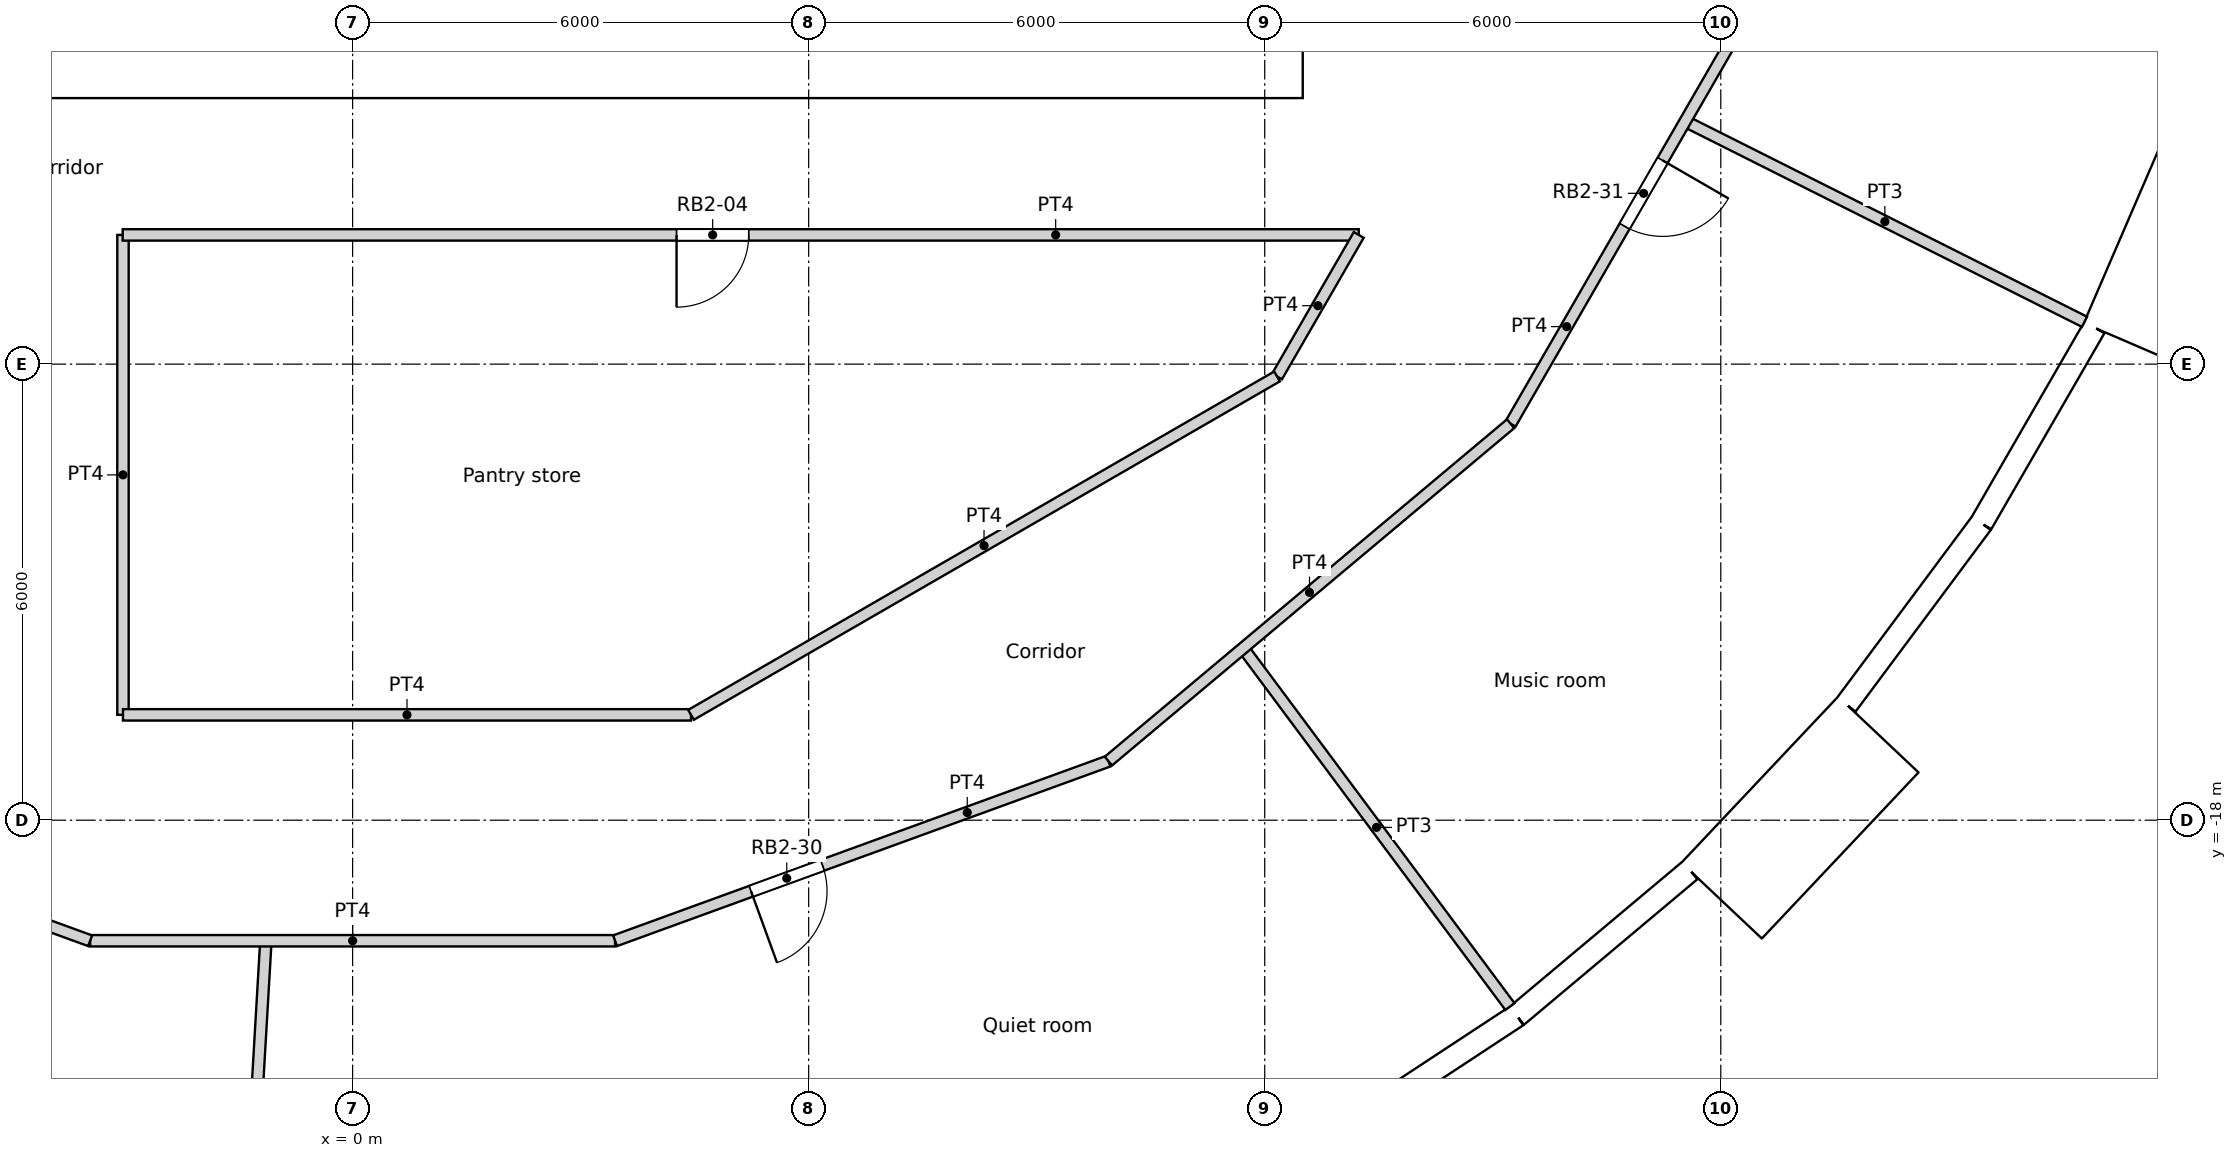
"""IFC4 building model, lengths in metres.
Left out: names, types, materials, properties, quantities, classifications, styles, units other than length and angle.
Written with IfcOpenShell. Run it as: python <this file> out.ifc"""

import sys

from ifc_helpers import new_model, si_unit, direction, frame, frame_2d, origin, origin_2d, place, context, subcontext, project, spatial, rectangle, circle, extrude, element, fill, save


model = new_model("IFC4")
c1 = context("Model", 3, precision=1e-05, world=origin(), true_north=direction((0.0, 1.0)))
c2 = subcontext(c1, "Body", "Model", "MODEL_VIEW")
j1 = project(units=[si_unit("LENGTHUNIT", "METRE"), si_unit("PLANEANGLEUNIT", "RADIAN")], contexts=[c1])
p1 = place(None, origin())
s1 = spatial("IfcSite", under=j1, at=p1, CompositionType="ELEMENT")
p2 = place(p1, origin())
s2 = spatial("IfcBuilding", under=s1, at=p2, CompositionType="ELEMENT")
p3 = place(p2, frame((0.0, 0.0, 136.8)))
s3 = spatial("IfcBuildingStorey", under=s2, at=p3, CompositionType="ELEMENT", Elevation=136.8)
for number, where, z_axis, x_axis in (
    (1, (14.659, -19.69, 0.0), (0.0, 0.0, 1.0), (1.0, 0.0, 0.0)),
    (2, (18.805, -15.779, 0.0), (0.0, 0.0, 1.0), (1.0, 0.0, 0.0)),
    (3, (21.937, -11.017, 0.0), (0.0, 0.0, 1.0), (1.0, 0.0, 0.0)),
):
    element("IfcColumn", number, at=place(p3, frame(where, z_axis=z_axis, x_axis=x_axis)), inside=s3, PredefinedType="COLUMN", context=c2, shape_type="SweptSolid", body=[
        extrude(circle(Radius=0.6, at=origin_2d()), origin(), (0.0, 0.0, 1.0), 3.6),
    ])
for number, where, z_axis, x_axis in (
    (4, (-4.188, -18.35, 0.0), (0.0, 0.0, 1.0), (1.0, 0.0, 0.0)),
    (5, (1.406, -18.77, 0.0), (0.0, 0.0, 1.0), (1.0, 0.0, 0.0)),
    (6, (6.876, -17.521, 0.0), (0.0, 0.0, 1.0), (1.0, 0.0, 0.0)),
    (7, (11.735, -14.716, 0.0), (0.0, 0.0, 1.0), (1.0, 0.0, 0.0)),
    (8, (15.552, -10.603, 0.0), (0.0, 0.0, 1.0), (1.0, 0.0, 0.0)),
):
    element("IfcColumn", number, at=place(p3, frame(where, z_axis=z_axis, x_axis=x_axis)), inside=s3, PredefinedType="COLUMN", context=c2, shape_type="SweptSolid", body=[
        extrude(circle(Radius=0.65, at=origin_2d()), origin(), (0.0, 0.0, 1.0), 3.6),
    ])
p4 = place(p3, frame((12.832, -22.206, 0.0), z_axis=(0.0, 0.0, 1.0), x_axis=(0.835508361394, 0.54947773207, 0.0)))
e9 = element("IfcWall", 9, at=p4, inside=s3, PredefinedType="SOLIDWALL", context=c2, shape_type="SweptSolid", body=[
    extrude(rectangle(XDim=2.973, YDim=0.3, at=frame_2d((1.486, 0.0))), origin(), (0.0, 0.0, 1.0), 2.8),
])
p5 = place(p4, frame((1.486, 0.0, 1.55)))
e10 = element("IfcOpeningElement", 10, at=p5, cuts=e9, PredefinedType="OPENING", context=c2, shape_type="SweptSolid", body=[
    extrude(circle(Radius=0.9, at=origin_2d()), frame((0.0, 0.16, 0.0), z_axis=(0.0, -1.0, 0.0), x_axis=(1.0, 0.0, 0.0)), (0.0, 0.0, 1.0), 0.32),
])
p6 = place(p3, frame((15.316, -20.573, 0.0), z_axis=(0.0, 0.0, 1.0), x_axis=(0.766008913364, 0.642829950023, 0.0)))
e11 = element("IfcWall", 11, at=p6, inside=s3, PredefinedType="SOLIDWALL", context=c2, shape_type="SweptSolid", body=[
    extrude(rectangle(XDim=2.973, YDim=0.3, at=frame_2d((1.486, 0.0))), origin(), (0.0, 0.0, 1.0), 3.3),
])
p7 = place(p6, frame((1.486, 0.0, 1.55)))
e12 = element("IfcOpeningElement", 12, at=p7, cuts=e11, PredefinedType="OPENING", context=c2, shape_type="SweptSolid", body=[
    extrude(circle(Radius=0.9, at=origin_2d()), frame((0.0, 0.16, 0.0), z_axis=(0.0, -1.0, 0.0), x_axis=(1.0, 0.0, 0.0)), (0.0, 0.0, 1.0), 0.32),
])
p8 = place(p3, frame((18.013, -19.056, -0.3), z_axis=(0.0, 0.0, 1.0), x_axis=(0.686217177108, 0.727396718334, 0.0)))
e13 = element("IfcWall", 13, at=p8, inside=s3, PredefinedType="ELEMENTEDWALL", context=c2, shape_type="SweptSolid", body=[
    extrude(rectangle(XDim=3.0, YDim=1.45, at=frame_2d((1.5, 0.0))), origin(), (0.0, 0.0, 1.0), 3.6),
])
p9 = place(p8, frame((1.5, 0.0, 1.85)))
e14 = element("IfcOpeningElement", 14, at=p9, cuts=e13, PredefinedType="OPENING", context=c2, shape_type="SweptSolid", body=[
    extrude(circle(Radius=0.9, at=origin_2d()), frame((0.0, 0.735, 0.0), z_axis=(0.0, -1.0, 0.0), x_axis=(1.0, 0.0, 0.0)), (0.0, 0.0, 1.0), 1.47),
])
p10 = place(p3, frame((19.653, -16.478, 0.0), z_axis=(0.0, 0.0, 1.0), x_axis=(0.597197580538, 0.80209416517, 0.0)))
e15 = element("IfcWall", 15, at=p10, inside=s3, PredefinedType="SOLIDWALL", context=c2, shape_type="SweptSolid", body=[
    extrude(rectangle(XDim=2.973, YDim=0.3, at=frame_2d((1.486, 0.0))), origin(), (0.0, 0.0, 1.0), 2.8),
])
p11 = place(p10, frame((1.486, 0.0, 1.55)))
e16 = element("IfcOpeningElement", 16, at=p11, cuts=e15, PredefinedType="OPENING", context=c2, shape_type="SweptSolid", body=[
    extrude(circle(Radius=0.9, at=origin_2d()), frame((0.0, 0.16, 0.0), z_axis=(0.0, -1.0, 0.0), x_axis=(1.0, 0.0, 0.0)), (0.0, 0.0, 1.0), 0.32),
])
p12 = place(p3, frame((21.428, -14.094, 0.0), z_axis=(0.0, 0.0, 1.0), x_axis=(0.499954672104, 0.866051572276, 0.0)))
e17 = element("IfcWall", 17, at=p12, inside=s3, PredefinedType="SOLIDWALL", context=c2, shape_type="SweptSolid", body=[
    extrude(rectangle(XDim=2.973, YDim=0.3, at=frame_2d((1.486, 0.0))), origin(), (0.0, 0.0, 1.0), 3.3),
])
p13 = place(p12, frame((1.486, 0.0, 1.55)))
e18 = element("IfcOpeningElement", 18, at=p13, cuts=e17, PredefinedType="OPENING", context=c2, shape_type="SweptSolid", body=[
    extrude(circle(Radius=0.9, at=origin_2d()), frame((0.0, 0.16, 0.0), z_axis=(0.0, -1.0, 0.0), x_axis=(1.0, 0.0, 0.0)), (0.0, 0.0, 1.0), 0.32),
])
p14 = place(p3, frame((23.444, -11.746, -0.3), z_axis=(0.0, 0.0, 1.0), x_axis=(0.396079003245, 0.918216435917, 0.0)))
e19 = element("IfcWall", 19, at=p14, inside=s3, PredefinedType="ELEMENTEDWALL", context=c2, shape_type="SweptSolid", body=[
    extrude(rectangle(XDim=3.0, YDim=1.45, at=frame_2d((1.5, 0.0))), origin(), (0.0, 0.0, 1.0), 3.6),
])
p15 = place(p14, frame((1.5, 0.0, 1.85)))
e20 = element("IfcOpeningElement", 20, at=p15, cuts=e19, PredefinedType="OPENING", context=c2, shape_type="SweptSolid", body=[
    extrude(circle(Radius=0.9, at=origin_2d()), frame((0.0, 0.735, 0.0), z_axis=(0.0, -1.0, 0.0), x_axis=(1.0, 0.0, 0.0)), (0.0, 0.0, 1.0), 1.47),
])
p16 = place(p3, frame((-12.5, -8.05, 0.0), z_axis=(0.0, 0.0, 1.0), x_axis=(1.0, 0.0, 0.0)))
e21 = element("IfcWall", 21, at=p16, inside=s3, PredefinedType="SOLIDWALL", context=c2, shape_type="SweptSolid", body=[
    extrude(rectangle(XDim=25.0, YDim=0.9, at=frame_2d((12.5, 0.0))), origin(), (0.0, 0.0, 1.0), 3.6),
])
p17 = place(p16, frame((13.4, 0.0, 0.0)))
e22 = element("IfcOpeningElement", 22, at=p17, cuts=e21, PredefinedType="OPENING", context=c2, shape_type="SweptSolid", body=[
    extrude(rectangle(XDim=1.0, YDim=2.1, at=frame_2d((0.5, 1.05))), frame((0.0, 0.45, 0.0), z_axis=(0.0, -1.0, 0.0), x_axis=(1.0, 0.0, 0.0)), (0.0, 0.0, 1.0), 0.9),
])
p18 = place(p16, frame((8.3, 0.0, 0.0)))
e23 = element("IfcOpeningElement", 23, at=p18, cuts=e21, PredefinedType="OPENING", context=c2, shape_type="SweptSolid", body=[
    extrude(rectangle(XDim=1.8, YDim=2.1, at=frame_2d((0.9, 1.05))), frame((0.0, 0.45, 0.0), z_axis=(0.0, -1.0, 0.0), x_axis=(1.0, 0.0, 0.0)), (0.0, 0.0, 1.0), 0.9),
])
p19 = place(p16, frame((14.9, 0.0, 0.0)))
e24 = element("IfcOpeningElement", 24, at=p19, cuts=e21, PredefinedType="OPENING", context=c2, shape_type="SweptSolid", body=[
    extrude(rectangle(XDim=1.8, YDim=2.1, at=frame_2d((0.9, 1.05))), frame((0.0, 0.45, 0.0), z_axis=(0.0, -1.0, 0.0), x_axis=(1.0, 0.0, 0.0)), (0.0, 0.0, 1.0), 0.9),
])
p20 = place(p3, frame((-3.025, -10.3, 0.0), z_axis=(0.0, 0.0, 1.0), x_axis=(1.0, 0.0, 0.0)))
e25 = element("IfcWall", 25, at=p20, inside=s3, PredefinedType="PARTITIONING", context=c2, shape_type="SweptSolid", body=[
    extrude(rectangle(XDim=16.262, YDim=0.15, at=frame_2d((8.131, 0.0))), origin(), (0.0, 0.0, 1.0), 3.3),
])
p21 = place(p20, frame((7.287, 0.0, 0.0)))
e26 = element("IfcOpeningElement", 26, at=p21, cuts=e25, PredefinedType="OPENING", context=c2, shape_type="SweptSolid", body=[
    extrude(rectangle(XDim=0.95, YDim=2.1, at=frame_2d((0.475, 1.05))), frame((0.0, 0.075, 0.0), z_axis=(0.0, -1.0, 0.0), x_axis=(1.0, 0.0, 0.0)), (0.0, 0.0, 1.0), 0.15),
])
p22 = place(p3, frame((12.162, -12.162, 0.0), z_axis=(0.0, 0.0, 1.0), x_axis=(0.499961633463, 0.866047553582, 0.0)))
e27 = element("IfcWall", 27, at=p22, inside=s3, PredefinedType="PARTITIONING", context=c2, shape_type="SweptSolid", body=[
    extrude(rectangle(XDim=2.15, YDim=0.15, at=frame_2d((1.075, 0.0))), origin(), (0.0, 0.0, 1.0), 3.3),
])
p23 = place(p3, frame((15.235, -12.784, 0.0), z_axis=(0.0, 0.0, 1.0), x_axis=(0.499914202267, 0.866074933462, 0.0)))
e28 = element("IfcWall", 28, at=p23, inside=s3, PredefinedType="PARTITIONING", context=c2, shape_type="SweptSolid", body=[
    extrude(rectangle(XDim=6.907, YDim=0.15, at=frame_2d((3.454, 0.0))), origin(), (0.0, 0.0, 1.0), 3.3),
])
p24 = place(p23, frame((3.0, 0.0, 0.0)))
e29 = element("IfcOpeningElement", 29, at=p24, cuts=e28, PredefinedType="OPENING", context=c2, shape_type="SweptSolid", body=[
    extrude(rectangle(XDim=1.0, YDim=2.04, at=frame_2d((0.5, 1.02))), frame((0.0, 0.075, 0.0), z_axis=(0.0, -1.0, 0.0), x_axis=(1.0, 0.0, 0.0)), (0.0, 0.0, 1.0), 0.15),
])
p25 = place(p3, frame((9.943, -17.222, 0.0), z_axis=(0.0, 0.0, 1.0), x_axis=(0.766192104565, 0.642611592567, 0.0)))
e30 = element("IfcWall", 30, at=p25, inside=s3, PredefinedType="PARTITIONING", context=c2, shape_type="SweptSolid", body=[
    extrude(rectangle(XDim=6.906, YDim=0.15, at=frame_2d((3.453, 0.0))), origin(), (0.0, 0.0, 1.0), 3.3),
])
p26 = place(p3, frame((-3.021, -16.614, 0.0), z_axis=(0.0, 0.0, 1.0), x_axis=(0.0, 1.0, 0.0)))
e31 = element("IfcWall", 31, at=p26, inside=s3, PredefinedType="PARTITIONING", context=c2, shape_type="SweptSolid", body=[
    extrude(rectangle(XDim=6.314, YDim=0.15, at=frame_2d((3.157, 0.0))), origin(), (0.0, 0.0, 1.0), 3.3),
])
p27 = place(p3, frame((-3.021, -16.614, 0.0), z_axis=(0.0, 0.0, 1.0), x_axis=(1.0, 0.0, 0.0)))
e32 = element("IfcWall", 32, at=p27, inside=s3, PredefinedType="PARTITIONING", context=c2, shape_type="SweptSolid", body=[
    extrude(rectangle(XDim=7.473, YDim=0.15, at=frame_2d((3.736, 0.0))), origin(), (0.0, 0.0, 1.0), 3.3),
])
p28 = place(p3, frame((4.452, -16.614, 0.0), z_axis=(0.0, 0.0, 1.0), x_axis=(0.866005203721, 0.500034985904, 0.0)))
e33 = element("IfcWall", 33, at=p28, inside=s3, PredefinedType="PARTITIONING", context=c2, shape_type="SweptSolid", body=[
    extrude(rectangle(XDim=8.903, YDim=0.15, at=frame_2d((4.452, 0.0))), origin(), (0.0, 0.0, 1.0), 3.3),
])
p29 = place(p3, frame((-3.453, -19.586, 0.0), z_axis=(0.0, 0.0, 1.0), x_axis=(1.0, 0.0, 0.0)))
e34 = element("IfcWall", 34, at=p29, inside=s3, PredefinedType="PARTITIONING", context=c2, shape_type="SweptSolid", body=[
    extrude(rectangle(XDim=6.906, YDim=0.15, at=frame_2d((3.453, 0.0))), origin(), (0.0, 0.0, 1.0), 3.3),
])
p30 = place(p3, frame((-9.944, -17.223, 0.0), z_axis=(0.0, 0.0, 1.0), x_axis=(0.939672634566, -0.342075050021, 0.0)))
e35 = element("IfcWall", 35, at=p30, inside=s3, PredefinedType="PARTITIONING", context=c2, shape_type="SweptSolid", body=[
    extrude(rectangle(XDim=6.908, YDim=0.15, at=frame_2d((3.454, 0.0))), origin(), (0.0, 0.0, 1.0), 3.3),
])
p31 = place(p30, frame((2.954, 0.0, 0.0)))
e36 = element("IfcOpeningElement", 36, at=p31, cuts=e35, PredefinedType="OPENING", context=c2, shape_type="SweptSolid", body=[
    extrude(rectangle(XDim=1.0, YDim=2.04, at=frame_2d((0.5, 1.02))), frame((0.0, 0.075, 0.0), z_axis=(0.0, -1.0, 0.0), x_axis=(1.0, 0.0, 0.0)), (0.0, 0.0, 1.0), 0.15),
])
p32 = place(p3, frame((3.453, -19.586, 0.0), z_axis=(0.0, 0.0, 1.0), x_axis=(0.939672634566, 0.342075050021, 0.0)))
e37 = element("IfcWall", 37, at=p32, inside=s3, PredefinedType="PARTITIONING", context=c2, shape_type="SweptSolid", body=[
    extrude(rectangle(XDim=6.908, YDim=0.15, at=frame_2d((3.454, 0.0))), origin(), (0.0, 0.0, 1.0), 3.3),
])
p33 = place(p32, frame((1.904, 0.0, 0.0)))
e38 = element("IfcOpeningElement", 38, at=p33, cuts=e37, PredefinedType="OPENING", context=c2, shape_type="SweptSolid", body=[
    extrude(rectangle(XDim=1.0, YDim=2.04, at=frame_2d((0.5, 1.02))), frame((0.0, 0.075, 0.0), z_axis=(0.0, -1.0, 0.0), x_axis=(1.0, 0.0, 0.0)), (0.0, 0.0, 1.0), 0.15),
])
p34 = place(p3, frame((-1.483, -25.454, 0.0), z_axis=(0.0, 0.0, 1.0), x_axis=(0.058147412668, 0.998308007781, 0.0)))
e39 = element("IfcWall", 39, at=p34, inside=s3, PredefinedType="PARTITIONING", context=c2, shape_type="SweptSolid", body=[
    extrude(rectangle(XDim=5.878, YDim=0.15, at=frame_2d((2.939, 0.0))), origin(), (0.0, 0.0, 1.0), 3.3),
])
p35 = place(p3, frame((11.716, -15.737, 0.0), z_axis=(0.0, 0.0, 1.0), x_axis=(0.597151875745, -0.802128192557, 0.0)))
e40 = element("IfcWall", 40, at=p35, inside=s3, PredefinedType="PARTITIONING", context=c2, shape_type="SweptSolid", body=[
    extrude(rectangle(XDim=5.878, YDim=0.15, at=frame_2d((2.939, 0.0))), origin(), (0.0, 0.0, 1.0), 3.3),
])
p36 = place(p3, frame((17.532, -8.805, 0.0), z_axis=(0.0, 0.0, 1.0), x_axis=(0.893628331628, -0.448807759415, 0.0)))
e41 = element("IfcWall", 41, at=p36, inside=s3, PredefinedType="PARTITIONING", context=c2, shape_type="SweptSolid", body=[
    extrude(rectangle(XDim=5.878, YDim=0.15, at=frame_2d((2.939, 0.0))), origin(), (0.0, 0.0, 1.0), 3.3),
])
p37 = place(p5, origin())
e42 = element("IfcWindow", 42, at=p37, inside=s3, PartitioningType="SINGLE_PANEL", PredefinedType="WINDOW", context=c2, shape_type="SweptSolid", body=[
    extrude(circle(Radius=0.9, at=origin_2d()), frame((0.0, 0.12, 0.0), z_axis=(0.0, -1.0, 0.0), x_axis=(1.0, 0.0, 0.0)), (0.0, 0.0, 1.0), 0.1),
])
fill(e10, e42)
p38 = place(p7, origin())
e43 = element("IfcWindow", 43, at=p38, inside=s3, PartitioningType="SINGLE_PANEL", PredefinedType="WINDOW", context=c2, shape_type="SweptSolid", body=[
    extrude(circle(Radius=0.9, at=origin_2d()), frame((0.0, 0.12, 0.0), z_axis=(0.0, -1.0, 0.0), x_axis=(1.0, 0.0, 0.0)), (0.0, 0.0, 1.0), 0.1),
])
fill(e12, e43)
p39 = place(p9, origin())
e44 = element("IfcWindow", 44, at=p39, inside=s3, PartitioningType="SINGLE_PANEL", PredefinedType="WINDOW", context=c2, shape_type="SweptSolid", body=[
    extrude(circle(Radius=0.9, at=origin_2d()), frame((0.0, 0.695, 0.0), z_axis=(0.0, -1.0, 0.0), x_axis=(1.0, 0.0, 0.0)), (0.0, 0.0, 1.0), 0.1),
])
fill(e14, e44)
p40 = place(p11, origin())
e45 = element("IfcWindow", 45, at=p40, inside=s3, PartitioningType="SINGLE_PANEL", PredefinedType="WINDOW", context=c2, shape_type="SweptSolid", body=[
    extrude(circle(Radius=0.9, at=origin_2d()), frame((0.0, 0.12, 0.0), z_axis=(0.0, -1.0, 0.0), x_axis=(1.0, 0.0, 0.0)), (0.0, 0.0, 1.0), 0.1),
])
fill(e16, e45)
p41 = place(p13, origin())
e46 = element("IfcWindow", 46, at=p41, inside=s3, PartitioningType="SINGLE_PANEL", PredefinedType="WINDOW", context=c2, shape_type="SweptSolid", body=[
    extrude(circle(Radius=0.9, at=origin_2d()), frame((0.0, 0.12, 0.0), z_axis=(0.0, -1.0, 0.0), x_axis=(1.0, 0.0, 0.0)), (0.0, 0.0, 1.0), 0.1),
])
fill(e18, e46)
p42 = place(p15, origin())
e47 = element("IfcWindow", 47, at=p42, inside=s3, PartitioningType="SINGLE_PANEL", PredefinedType="WINDOW", context=c2, shape_type="SweptSolid", body=[
    extrude(circle(Radius=0.9, at=origin_2d()), frame((0.0, 0.695, 0.0), z_axis=(0.0, -1.0, 0.0), x_axis=(1.0, 0.0, 0.0)), (0.0, 0.0, 1.0), 0.1),
])
fill(e20, e47)
p43 = place(p17, origin())
e48 = element("IfcDoor", 48, at=p43, inside=s3, OperationType="SINGLE_SWING_LEFT", PredefinedType="DOOR", context=c2, shape_type="SweptSolid", body=[
    extrude(rectangle(XDim=1.0, YDim=2.1, at=frame_2d((0.5, 1.05))), frame((0.0, 0.025, 0.0), z_axis=(0.0, -1.0, 0.0), x_axis=(1.0, 0.0, 0.0)), (0.0, 0.0, 1.0), 0.05),
])
fill(e22, e48)
p44 = place(p18, origin())
e49 = element("IfcDoor", 49, at=p44, inside=s3, OperationType="DOUBLE_DOOR_SINGLE_SWING", PredefinedType="DOOR", context=c2, shape_type="SweptSolid", body=[
    extrude(rectangle(XDim=1.8, YDim=2.1, at=frame_2d((0.9, 1.05))), frame((0.0, 0.025, 0.0), z_axis=(0.0, -1.0, 0.0), x_axis=(1.0, 0.0, 0.0)), (0.0, 0.0, 1.0), 0.05),
])
fill(e23, e49)
p45 = place(p19, origin())
e50 = element("IfcDoor", 50, at=p45, inside=s3, OperationType="DOUBLE_DOOR_SINGLE_SWING", PredefinedType="DOOR", context=c2, shape_type="SweptSolid", body=[
    extrude(rectangle(XDim=1.8, YDim=2.1, at=frame_2d((0.9, 1.05))), frame((0.0, 0.025, 0.0), z_axis=(0.0, -1.0, 0.0), x_axis=(1.0, 0.0, 0.0)), (0.0, 0.0, 1.0), 0.05),
])
fill(e24, e50)
p46 = place(p21, origin())
e51 = element("IfcDoor", 51, at=p46, inside=s3, OperationType="SINGLE_SWING_RIGHT", PredefinedType="DOOR", context=c2, shape_type="SweptSolid", body=[
    extrude(rectangle(XDim=0.95, YDim=2.1, at=frame_2d((0.475, 1.05))), frame((0.0, 0.025, 0.0), z_axis=(0.0, -1.0, 0.0), x_axis=(1.0, 0.0, 0.0)), (0.0, 0.0, 1.0), 0.05),
])
fill(e26, e51)
p47 = place(p33, origin())
e52 = element("IfcDoor", 52, at=p47, inside=s3, OperationType="SINGLE_SWING_RIGHT", PredefinedType="DOOR", context=c2, shape_type="SweptSolid", body=[
    extrude(rectangle(XDim=1.0, YDim=2.04, at=frame_2d((0.5, 1.02))), frame((0.0, 0.025, 0.0), z_axis=(0.0, -1.0, 0.0), x_axis=(1.0, 0.0, 0.0)), (0.0, 0.0, 1.0), 0.05),
])
fill(e38, e52)
p48 = place(p24, origin())
e53 = element("IfcDoor", 53, at=p48, inside=s3, OperationType="SINGLE_SWING_LEFT", PredefinedType="DOOR", context=c2, shape_type="SweptSolid", body=[
    extrude(rectangle(XDim=1.0, YDim=2.04, at=frame_2d((0.5, 1.02))), frame((0.0, 0.025, 0.0), z_axis=(0.0, -1.0, 0.0), x_axis=(1.0, 0.0, 0.0)), (0.0, 0.0, 1.0), 0.05),
])
fill(e29, e53)
save(model, sys.argv[1])
